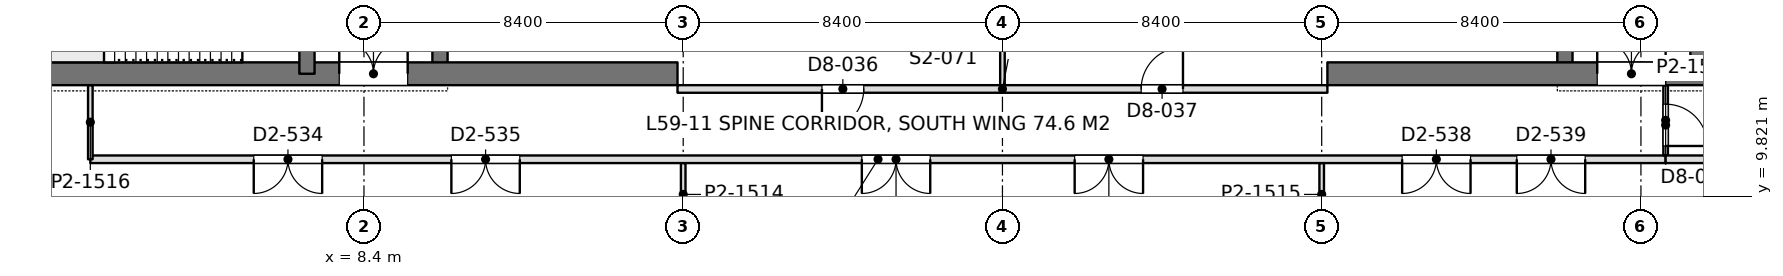
"""IFC4 building model, lengths in metres.
Left out: names, types, materials, properties, quantities, classifications, styles, units other than length and angle.
Written with IfcOpenShell. Run it as: python <this file> out.ifc"""

import sys

from ifc_helpers import new_model, si_unit, direction, frame, frame_2d, origin, place, context, subcontext, project, spatial, rectangle, extrude, element, fill, save


model = new_model("IFC4")
c1 = context("Model", 3, precision=1e-05, world=origin(), true_north=direction((0.0, 1.0)))
c2 = subcontext(c1, "Body", "Model", "MODEL_VIEW")
j1 = project(units=[si_unit("LENGTHUNIT", "METRE"), si_unit("PLANEANGLEUNIT", "RADIAN")], contexts=[c1])
p1 = place(None, origin())
s1 = spatial("IfcSite", under=j1, at=p1, CompositionType="ELEMENT")
p2 = place(p1, origin())
s2 = spatial("IfcBuilding", under=s1, at=p2, CompositionType="ELEMENT")
p3 = place(p2, frame((0.0, 0.0, 259.2)))
s3 = spatial("IfcBuildingStorey", under=s2, at=p3, CompositionType="ELEMENT", Elevation=259.2)
p4 = place(p3, frame((-1.05, 13.05, 0.0), z_axis=(0.0, 0.0, 1.0), x_axis=(1.0, 0.0, 0.0)))
e1 = element("IfcWall", 1, at=p4, inside=s3, PredefinedType="SHEAR", context=c2, shape_type="SweptSolid", body=[
    extrude(rectangle(XDim=17.7, YDim=0.6, at=frame_2d((8.85, 0.0))), origin(), (0.0, 0.0, 1.0), 4.5),
])
p5 = place(p4, frame((8.8, 0.0, 0.0)))
e2 = element("IfcOpeningElement", 2, at=p5, cuts=e1, PredefinedType="OPENING", context=c2, shape_type="SweptSolid", body=[
    extrude(rectangle(XDim=1.8, YDim=2.4, at=frame_2d((0.9, 1.2))), frame((0.0, 0.31, 0.0), z_axis=(0.0, -1.0, 0.0), x_axis=(1.0, 0.0, 0.0)), (0.0, 0.0, 1.0), 0.62),
])
p6 = place(p3, frame((6.9, 13.05, 0.0), z_axis=(0.0, 0.0, 1.0), x_axis=(0.0, 1.0, 0.0)))
e3 = element("IfcWall", 3, at=p6, inside=s3, PredefinedType="SHEAR", context=c2, shape_type="SweptSolid", body=[
    extrude(rectangle(XDim=24.3, YDim=0.4, at=frame_2d((12.15, 0.0))), origin(), (0.0, 0.0, 1.0), 4.5),
])
p7 = place(p6, frame((1.3, 0.0, 0.0)))
e4 = element("IfcOpeningElement", 4, at=p7, cuts=e3, PredefinedType="OPENING", context=c2, shape_type="SweptSolid", body=[
    extrude(rectangle(XDim=1.0, YDim=2.2, at=frame_2d((0.5, 1.1))), frame((0.0, 0.21, 0.0), z_axis=(0.0, -1.0, 0.0), x_axis=(1.0, 0.0, 0.0)), (0.0, 0.0, 1.0), 0.42),
])
p8 = place(p6, frame((22.0, 0.0, 0.0)))
e5 = element("IfcOpeningElement", 5, at=p8, cuts=e3, PredefinedType="OPENING", context=c2, shape_type="SweptSolid", body=[
    extrude(rectangle(XDim=1.0, YDim=2.2, at=frame_2d((0.5, 1.1))), frame((0.0, 0.21, 0.0), z_axis=(0.0, -1.0, 0.0), x_axis=(1.0, 0.0, 0.0)), (0.0, 0.0, 1.0), 0.42),
])
p9 = place(p6, frame((5.55, 0.0, 0.0)))
e6 = element("IfcOpeningElement", 6, at=p9, cuts=e3, PredefinedType="OPENING", context=c2, shape_type="SweptSolid", body=[
    extrude(rectangle(XDim=1.0, YDim=2.2, at=frame_2d((0.5, 1.1))), frame((0.0, 0.21, 0.0), z_axis=(0.0, -1.0, 0.0), x_axis=(1.0, 0.0, 0.0)), (0.0, 0.0, 1.0), 0.42),
])
p10 = place(p6, frame((9.55, 0.0, 0.0)))
e7 = element("IfcOpeningElement", 7, at=p10, cuts=e3, PredefinedType="OPENING", context=c2, shape_type="SweptSolid", body=[
    extrude(rectangle(XDim=1.0, YDim=2.2, at=frame_2d((0.5, 1.1))), frame((0.0, 0.21, 0.0), z_axis=(0.0, -1.0, 0.0), x_axis=(1.0, 0.0, 0.0)), (0.0, 0.0, 1.0), 0.42),
])
p11 = place(p6, frame((12.8, 0.0, 0.0)))
e8 = element("IfcOpeningElement", 8, at=p11, cuts=e3, PredefinedType="OPENING", context=c2, shape_type="SweptSolid", body=[
    extrude(rectangle(XDim=1.1, YDim=2.2, at=frame_2d((0.55, 1.1))), frame((0.0, 0.21, 0.0), z_axis=(0.0, -1.0, 0.0), x_axis=(1.0, 0.0, 0.0)), (0.0, 0.0, 1.0), 0.42),
])
p12 = place(p6, frame((15.538, 0.0, 0.0)))
e9 = element("IfcOpeningElement", 9, at=p12, cuts=e3, PredefinedType="OPENING", context=c2, shape_type="SweptSolid", body=[
    extrude(rectangle(XDim=1.1, YDim=2.2, at=frame_2d((0.55, 1.1))), frame((0.0, 0.21, 0.0), z_axis=(0.0, -1.0, 0.0), x_axis=(1.0, 0.0, 0.0)), (0.0, 0.0, 1.0), 0.42),
])
p13 = place(p6, frame((18.262, 0.0, 0.0)))
e10 = element("IfcOpeningElement", 10, at=p13, cuts=e3, PredefinedType="OPENING", context=c2, shape_type="SweptSolid", body=[
    extrude(rectangle(XDim=1.1, YDim=2.2, at=frame_2d((0.55, 1.1))), frame((0.0, 0.21, 0.0), z_axis=(0.0, -1.0, 0.0), x_axis=(1.0, 0.0, 0.0)), (0.0, 0.0, 1.0), 0.42),
])
p14 = place(p3, frame((10.4, 13.05, 0.0), z_axis=(0.0, 0.0, 1.0), x_axis=(0.0, 1.0, 0.0)))
e11 = element("IfcWall", 11, at=p14, inside=s3, PredefinedType="SHEAR", context=c2, shape_type="SweptSolid", body=[
    extrude(rectangle(XDim=24.3, YDim=0.4, at=frame_2d((12.15, 0.0))), origin(), (0.0, 0.0, 1.0), 4.5),
])
p15 = place(p14, frame((15.75, 0.0, 0.0)))
e12 = element("IfcOpeningElement", 12, at=p15, cuts=e11, PredefinedType="OPENING", context=c2, shape_type="SweptSolid", body=[
    extrude(rectangle(XDim=1.1, YDim=2.2, at=frame_2d((0.55, 1.1))), frame((0.0, 0.21, 0.0), z_axis=(0.0, -1.0, 0.0), x_axis=(1.0, 0.0, 0.0)), (0.0, 0.0, 1.0), 0.42),
])
p16 = place(p14, frame((18.6, 0.0, 0.0)))
e13 = element("IfcOpeningElement", 13, at=p16, cuts=e11, PredefinedType="OPENING", context=c2, shape_type="SweptSolid", body=[
    extrude(rectangle(XDim=1.1, YDim=2.2, at=frame_2d((0.55, 1.1))), frame((0.0, 0.21, 0.0), z_axis=(0.0, -1.0, 0.0), x_axis=(1.0, 0.0, 0.0)), (0.0, 0.0, 1.0), 0.42),
])
p17 = place(p14, frame((21.45, 0.0, 0.0)))
e14 = element("IfcOpeningElement", 14, at=p17, cuts=e11, PredefinedType="OPENING", context=c2, shape_type="SweptSolid", body=[
    extrude(rectangle(XDim=1.1, YDim=2.2, at=frame_2d((0.55, 1.1))), frame((0.0, 0.21, 0.0), z_axis=(0.0, -1.0, 0.0), x_axis=(1.0, 0.0, 0.0)), (0.0, 0.0, 1.0), 0.42),
])
p18 = place(p14, frame((8.65, 0.0, 0.0)))
e15 = element("IfcOpeningElement", 15, at=p18, cuts=e11, PredefinedType="OPENING", context=c2, shape_type="SweptSolid", body=[
    extrude(rectangle(XDim=1.8, YDim=2.4, at=frame_2d((0.9, 1.2))), frame((0.0, 0.21, 0.0), z_axis=(0.0, -1.0, 0.0), x_axis=(1.0, 0.0, 0.0)), (0.0, 0.0, 1.0), 0.42),
])
p19 = place(p3, frame((33.75, 13.05, 0.0), z_axis=(0.0, 0.0, 1.0), x_axis=(1.0, 0.0, 0.0)))
e16 = element("IfcWall", 16, at=p19, inside=s3, PredefinedType="SHEAR", context=c2, shape_type="SweptSolid", body=[
    extrude(rectangle(XDim=17.7, YDim=0.6, at=frame_2d((8.85, 0.0))), origin(), (0.0, 0.0, 1.0), 4.5),
])
p20 = place(p19, frame((7.1, 0.0, 0.0)))
e17 = element("IfcOpeningElement", 17, at=p20, cuts=e16, PredefinedType="OPENING", context=c2, shape_type="SweptSolid", body=[
    extrude(rectangle(XDim=1.8, YDim=2.4, at=frame_2d((0.9, 1.2))), frame((0.0, 0.31, 0.0), z_axis=(0.0, -1.0, 0.0), x_axis=(1.0, 0.0, 0.0)), (0.0, 0.0, 1.0), 0.62),
])
p21 = place(p3, frame((43.5, 13.05, 0.0), z_axis=(0.0, 0.0, 1.0), x_axis=(0.0, 1.0, 0.0)))
e18 = element("IfcWall", 18, at=p21, inside=s3, PredefinedType="SHEAR", context=c2, shape_type="SweptSolid", body=[
    extrude(rectangle(XDim=24.3, YDim=0.4, at=frame_2d((12.15, 0.0))), origin(), (0.0, 0.0, 1.0), 4.5),
])
p22 = place(p21, frame((1.3, 0.0, 0.0)))
e19 = element("IfcOpeningElement", 19, at=p22, cuts=e18, PredefinedType="OPENING", context=c2, shape_type="SweptSolid", body=[
    extrude(rectangle(XDim=1.0, YDim=2.2, at=frame_2d((0.5, 1.1))), frame((0.0, 0.21, 0.0), z_axis=(0.0, -1.0, 0.0), x_axis=(1.0, 0.0, 0.0)), (0.0, 0.0, 1.0), 0.42),
])
p23 = place(p21, frame((22.0, 0.0, 0.0)))
e20 = element("IfcOpeningElement", 20, at=p23, cuts=e18, PredefinedType="OPENING", context=c2, shape_type="SweptSolid", body=[
    extrude(rectangle(XDim=1.0, YDim=2.2, at=frame_2d((0.5, 1.1))), frame((0.0, 0.21, 0.0), z_axis=(0.0, -1.0, 0.0), x_axis=(1.0, 0.0, 0.0)), (0.0, 0.0, 1.0), 0.42),
])
p24 = place(p21, frame((5.55, 0.0, 0.0)))
e21 = element("IfcOpeningElement", 21, at=p24, cuts=e18, PredefinedType="OPENING", context=c2, shape_type="SweptSolid", body=[
    extrude(rectangle(XDim=1.0, YDim=2.2, at=frame_2d((0.5, 1.1))), frame((0.0, 0.21, 0.0), z_axis=(0.0, -1.0, 0.0), x_axis=(1.0, 0.0, 0.0)), (0.0, 0.0, 1.0), 0.42),
])
p25 = place(p21, frame((9.55, 0.0, 0.0)))
e22 = element("IfcOpeningElement", 22, at=p25, cuts=e18, PredefinedType="OPENING", context=c2, shape_type="SweptSolid", body=[
    extrude(rectangle(XDim=1.0, YDim=2.2, at=frame_2d((0.5, 1.1))), frame((0.0, 0.21, 0.0), z_axis=(0.0, -1.0, 0.0), x_axis=(1.0, 0.0, 0.0)), (0.0, 0.0, 1.0), 0.42),
])
p26 = place(p21, frame((12.8, 0.0, 0.0)))
e23 = element("IfcOpeningElement", 23, at=p26, cuts=e18, PredefinedType="OPENING", context=c2, shape_type="SweptSolid", body=[
    extrude(rectangle(XDim=1.1, YDim=2.2, at=frame_2d((0.55, 1.1))), frame((0.0, 0.21, 0.0), z_axis=(0.0, -1.0, 0.0), x_axis=(1.0, 0.0, 0.0)), (0.0, 0.0, 1.0), 0.42),
])
p27 = place(p21, frame((15.538, 0.0, 0.0)))
e24 = element("IfcOpeningElement", 24, at=p27, cuts=e18, PredefinedType="OPENING", context=c2, shape_type="SweptSolid", body=[
    extrude(rectangle(XDim=1.1, YDim=2.2, at=frame_2d((0.55, 1.1))), frame((0.0, 0.21, 0.0), z_axis=(0.0, -1.0, 0.0), x_axis=(1.0, 0.0, 0.0)), (0.0, 0.0, 1.0), 0.42),
])
p28 = place(p21, frame((18.262, 0.0, 0.0)))
e25 = element("IfcOpeningElement", 25, at=p28, cuts=e18, PredefinedType="OPENING", context=c2, shape_type="SweptSolid", body=[
    extrude(rectangle(XDim=1.1, YDim=2.2, at=frame_2d((0.55, 1.1))), frame((0.0, 0.21, 0.0), z_axis=(0.0, -1.0, 0.0), x_axis=(1.0, 0.0, 0.0)), (0.0, 0.0, 1.0), 0.42),
])
p29 = place(p3, frame((40.0, 13.05, 0.0), z_axis=(0.0, 0.0, 1.0), x_axis=(0.0, 1.0, 0.0)))
e26 = element("IfcWall", 26, at=p29, inside=s3, PredefinedType="SHEAR", context=c2, shape_type="SweptSolid", body=[
    extrude(rectangle(XDim=24.3, YDim=0.4, at=frame_2d((12.15, 0.0))), origin(), (0.0, 0.0, 1.0), 4.5),
])
p30 = place(p29, frame((15.75, 0.0, 0.0)))
e27 = element("IfcOpeningElement", 27, at=p30, cuts=e26, PredefinedType="OPENING", context=c2, shape_type="SweptSolid", body=[
    extrude(rectangle(XDim=1.1, YDim=2.2, at=frame_2d((0.55, 1.1))), frame((0.0, 0.21, 0.0), z_axis=(0.0, -1.0, 0.0), x_axis=(1.0, 0.0, 0.0)), (0.0, 0.0, 1.0), 0.42),
])
p31 = place(p29, frame((18.6, 0.0, 0.0)))
e28 = element("IfcOpeningElement", 28, at=p31, cuts=e26, PredefinedType="OPENING", context=c2, shape_type="SweptSolid", body=[
    extrude(rectangle(XDim=1.1, YDim=2.2, at=frame_2d((0.55, 1.1))), frame((0.0, 0.21, 0.0), z_axis=(0.0, -1.0, 0.0), x_axis=(1.0, 0.0, 0.0)), (0.0, 0.0, 1.0), 0.42),
])
p32 = place(p29, frame((21.45, 0.0, 0.0)))
e29 = element("IfcOpeningElement", 29, at=p32, cuts=e26, PredefinedType="OPENING", context=c2, shape_type="SweptSolid", body=[
    extrude(rectangle(XDim=1.1, YDim=2.2, at=frame_2d((0.55, 1.1))), frame((0.0, 0.21, 0.0), z_axis=(0.0, -1.0, 0.0), x_axis=(1.0, 0.0, 0.0)), (0.0, 0.0, 1.0), 0.42),
])
p33 = place(p29, frame((8.65, 0.0, 0.0)))
e30 = element("IfcOpeningElement", 30, at=p33, cuts=e26, PredefinedType="OPENING", context=c2, shape_type="SweptSolid", body=[
    extrude(rectangle(XDim=1.8, YDim=2.4, at=frame_2d((0.9, 1.2))), frame((0.0, 0.21, 0.0), z_axis=(0.0, -1.0, 0.0), x_axis=(1.0, 0.0, 0.0)), (0.0, 0.0, 1.0), 0.42),
])
for number, where, z_axis, x_axis in (
    (31, (16.8, 9.049, 0.0), (0.0, 0.0, 1.0), (0.0, 1.0, 0.0)),
    (32, (33.6, 9.049, 0.0), (0.0, 0.0, 1.0), (0.0, 1.0, 0.0)),
):
    element("IfcWall", number, at=place(p3, frame(where, z_axis=z_axis, x_axis=x_axis)), inside=s3, PredefinedType="PARTITIONING", context=c2, shape_type="SweptSolid", body=[
        extrude(rectangle(XDim=1.653, YDim=0.12, at=frame_2d((0.826, 0.0))), origin(), (0.0, 0.0, 1.0), 3.99),
    ])
p34 = place(p3, frame((1.2, 10.8, 0.0), z_axis=(0.0, 0.0, 1.0), x_axis=(1.0, 0.0, 0.0)))
e33 = element("IfcWall", 33, at=p34, inside=s3, PredefinedType="PARTITIONING", context=c2, shape_type="SweptSolid", body=[
    extrude(rectangle(XDim=41.452, YDim=0.2, at=frame_2d((20.726, 0.0))), origin(), (0.0, 0.0, 1.0), 3.8),
])
p35 = place(p34, frame((4.3, 0.0, 0.0)))
e34 = element("IfcOpeningElement", 34, at=p35, cuts=e33, PredefinedType="OPENING", context=c2, shape_type="SweptSolid", body=[
    extrude(rectangle(XDim=1.8, YDim=2.2, at=frame_2d((0.9, 1.1))), frame((0.0, 0.11, 0.0), z_axis=(0.0, -1.0, 0.0), x_axis=(1.0, 0.0, 0.0)), (0.0, 0.0, 1.0), 0.22),
])
p36 = place(p34, frame((9.5, 0.0, 0.0)))
e35 = element("IfcOpeningElement", 35, at=p36, cuts=e33, PredefinedType="OPENING", context=c2, shape_type="SweptSolid", body=[
    extrude(rectangle(XDim=1.8, YDim=2.2, at=frame_2d((0.9, 1.1))), frame((0.0, 0.11, 0.0), z_axis=(0.0, -1.0, 0.0), x_axis=(1.0, 0.0, 0.0)), (0.0, 0.0, 1.0), 0.22),
])
p37 = place(p34, frame((20.3, 0.0, 0.0)))
e36 = element("IfcOpeningElement", 36, at=p37, cuts=e33, PredefinedType="OPENING", context=c2, shape_type="SweptSolid", body=[
    extrude(rectangle(XDim=1.8, YDim=2.2, at=frame_2d((0.9, 1.1))), frame((0.0, 0.11, 0.0), z_axis=(0.0, -1.0, 0.0), x_axis=(1.0, 0.0, 0.0)), (0.0, 0.0, 1.0), 0.22),
])
p38 = place(p34, frame((25.9, 0.0, 0.0)))
e37 = element("IfcOpeningElement", 37, at=p38, cuts=e33, PredefinedType="OPENING", context=c2, shape_type="SweptSolid", body=[
    extrude(rectangle(XDim=1.8, YDim=2.2, at=frame_2d((0.9, 1.1))), frame((0.0, 0.11, 0.0), z_axis=(0.0, -1.0, 0.0), x_axis=(1.0, 0.0, 0.0)), (0.0, 0.0, 1.0), 0.22),
])
p39 = place(p34, frame((34.517, 0.0, 0.0)))
e38 = element("IfcOpeningElement", 38, at=p39, cuts=e33, PredefinedType="OPENING", context=c2, shape_type="SweptSolid", body=[
    extrude(rectangle(XDim=1.8, YDim=2.2, at=frame_2d((0.9, 1.1))), frame((0.0, 0.11, 0.0), z_axis=(0.0, -1.0, 0.0), x_axis=(1.0, 0.0, 0.0)), (0.0, 0.0, 1.0), 0.22),
])
p40 = place(p34, frame((37.533, 0.0, 0.0)))
e39 = element("IfcOpeningElement", 39, at=p40, cuts=e33, PredefinedType="OPENING", context=c2, shape_type="SweptSolid", body=[
    extrude(rectangle(XDim=1.8, YDim=2.2, at=frame_2d((0.9, 1.1))), frame((0.0, 0.11, 0.0), z_axis=(0.0, -1.0, 0.0), x_axis=(1.0, 0.0, 0.0)), (0.0, 0.0, 1.0), 0.22),
])
p41 = place(p3, frame((1.2, 10.8, 0.0), z_axis=(0.0, 0.0, 1.0), x_axis=(0.0, 1.0, 0.0)))
e40 = element("IfcWall", 40, at=p41, inside=s3, PredefinedType="PARTITIONING", context=c2, shape_type="SweptSolid", body=[
    extrude(rectangle(XDim=1.952, YDim=0.12, at=frame_2d((0.976, 0.0))), origin(), (0.0, 0.0, 1.0), 4.35),
])
p42 = place(p3, frame((42.65, 10.898, 0.0), z_axis=(0.0, 0.0, 1.0), x_axis=(0.0, 1.0, 0.0)))
e41 = element("IfcWall", 41, at=p42, inside=s3, PredefinedType="PARTITIONING", context=c2, shape_type="SweptSolid", body=[
    extrude(rectangle(XDim=1.854, YDim=0.12, at=frame_2d((0.927, 0.0))), origin(), (0.0, 0.0, 1.0), 4.35),
])
p43 = place(p42, frame((0.252, 0.0, 0.0)))
e42 = element("IfcOpeningElement", 42, at=p43, cuts=e41, PredefinedType="OPENING", context=c2, shape_type="SweptSolid", body=[
    extrude(rectangle(XDim=1.1, YDim=2.4, at=frame_2d((0.55, 1.2))), frame((0.0, 0.07, 0.0), z_axis=(0.0, -1.0, 0.0), x_axis=(1.0, 0.0, 0.0)), (0.0, 0.0, 1.0), 0.14),
])
p44 = place(p3, frame((42.648, 10.8, 0.0), z_axis=(0.0, 0.0, 1.0), x_axis=(1.0, 0.0, 0.0)))
e43 = element("IfcWall", 43, at=p44, inside=s3, PredefinedType="PARTITIONING", context=c2, shape_type="SweptSolid", body=[
    extrude(rectangle(XDim=6.552, YDim=0.2, at=frame_2d((3.276, 0.0))), origin(), (0.0, 0.0, 1.0), 4.35),
])
p45 = place(p3, frame((25.2, 12.698, 0.0), z_axis=(0.0, 0.0, 1.0), x_axis=(0.0, 1.0, 0.0)))
e44 = element("IfcWall", 44, at=p45, inside=s3, PredefinedType="PARTITIONING", context=c2, shape_type="SweptSolid", body=[
    extrude(rectangle(XDim=3.603, YDim=0.12, at=frame_2d((1.802, 0.0))), origin(), (0.0, 0.0, 1.0), 3.8),
])
p46 = place(p3, frame((16.65, 12.65, 0.0), z_axis=(0.0, 0.0, 1.0), x_axis=(1.0, 0.0, 0.0)))
e45 = element("IfcWall", 45, at=p46, inside=s3, PredefinedType="PARTITIONING", context=c2, shape_type="SweptSolid", body=[
    extrude(rectangle(XDim=17.1, YDim=0.2, at=frame_2d((8.55, 0.0))), origin(), (0.0, 0.0, 1.0), 3.8),
])
p47 = place(p46, frame((3.8, 0.0, 0.0)))
e46 = element("IfcOpeningElement", 46, at=p47, cuts=e45, PredefinedType="OPENING", context=c2, shape_type="SweptSolid", body=[
    extrude(rectangle(XDim=1.1, YDim=2.4, at=frame_2d((0.55, 1.2))), frame((0.0, 0.11, 0.0), z_axis=(0.0, -1.0, 0.0), x_axis=(1.0, 0.0, 0.0)), (0.0, 0.0, 1.0), 0.22),
])
p48 = place(p46, frame((12.2, 0.0, 0.0)))
e47 = element("IfcOpeningElement", 47, at=p48, cuts=e45, PredefinedType="OPENING", context=c2, shape_type="SweptSolid", body=[
    extrude(rectangle(XDim=1.1, YDim=2.4, at=frame_2d((0.55, 1.2))), frame((0.0, 0.11, 0.0), z_axis=(0.0, -1.0, 0.0), x_axis=(1.0, 0.0, 0.0)), (0.0, 0.0, 1.0), 0.22),
])
p49 = place(p5, origin())
e48 = element("IfcDoor", 48, at=p49, inside=s3, OperationType="DOUBLE_DOOR_SINGLE_SWING", PredefinedType="DOOR", context=c2, shape_type="SweptSolid", body=[
    extrude(rectangle(XDim=1.8, YDim=2.4, at=frame_2d((0.9, 1.2))), frame((0.0, 0.025, 0.0), z_axis=(0.0, -1.0, 0.0), x_axis=(1.0, 0.0, 0.0)), (0.0, 0.0, 1.0), 0.05),
])
fill(e2, e48)
p50 = place(p20, origin())
e49 = element("IfcDoor", 49, at=p50, inside=s3, OperationType="DOUBLE_DOOR_SINGLE_SWING", PredefinedType="DOOR", context=c2, shape_type="SweptSolid", body=[
    extrude(rectangle(XDim=1.8, YDim=2.4, at=frame_2d((0.9, 1.2))), frame((0.0, 0.025, 0.0), z_axis=(0.0, -1.0, 0.0), x_axis=(1.0, 0.0, 0.0)), (0.0, 0.0, 1.0), 0.05),
])
fill(e17, e49)
p51 = place(p35, frame((1.8, 0.0, 0.0), z_axis=(0.0, 0.0, 1.0), x_axis=(-1.0, 0.0, 0.0)))
e50 = element("IfcDoor", 50, at=p51, inside=s3, OperationType="DOUBLE_DOOR_SINGLE_SWING", PredefinedType="DOOR", context=c2, shape_type="SweptSolid", body=[
    extrude(rectangle(XDim=1.8, YDim=2.2, at=frame_2d((0.9, 1.1))), frame((0.0, 0.025, 0.0), z_axis=(0.0, -1.0, 0.0), x_axis=(1.0, 0.0, 0.0)), (0.0, 0.0, 1.0), 0.05),
])
fill(e34, e50)
p52 = place(p36, frame((1.8, 0.0, 0.0), z_axis=(0.0, 0.0, 1.0), x_axis=(-1.0, 0.0, 0.0)))
e51 = element("IfcDoor", 51, at=p52, inside=s3, OperationType="DOUBLE_DOOR_SINGLE_SWING", PredefinedType="DOOR", context=c2, shape_type="SweptSolid", body=[
    extrude(rectangle(XDim=1.8, YDim=2.2, at=frame_2d((0.9, 1.1))), frame((0.0, 0.025, 0.0), z_axis=(0.0, -1.0, 0.0), x_axis=(1.0, 0.0, 0.0)), (0.0, 0.0, 1.0), 0.05),
])
fill(e35, e51)
p53 = place(p37, frame((1.8, 0.0, 0.0), z_axis=(0.0, 0.0, 1.0), x_axis=(-1.0, 0.0, 0.0)))
e52 = element("IfcDoor", 52, at=p53, inside=s3, OperationType="DOUBLE_DOOR_SINGLE_SWING", PredefinedType="DOOR", context=c2, shape_type="SweptSolid", body=[
    extrude(rectangle(XDim=1.8, YDim=2.2, at=frame_2d((0.9, 1.1))), frame((0.0, 0.025, 0.0), z_axis=(0.0, -1.0, 0.0), x_axis=(1.0, 0.0, 0.0)), (0.0, 0.0, 1.0), 0.05),
])
fill(e36, e52)
p54 = place(p38, frame((1.8, 0.0, 0.0), z_axis=(0.0, 0.0, 1.0), x_axis=(-1.0, 0.0, 0.0)))
e53 = element("IfcDoor", 53, at=p54, inside=s3, OperationType="DOUBLE_DOOR_SINGLE_SWING", PredefinedType="DOOR", context=c2, shape_type="SweptSolid", body=[
    extrude(rectangle(XDim=1.8, YDim=2.2, at=frame_2d((0.9, 1.1))), frame((0.0, 0.025, 0.0), z_axis=(0.0, -1.0, 0.0), x_axis=(1.0, 0.0, 0.0)), (0.0, 0.0, 1.0), 0.05),
])
fill(e37, e53)
p55 = place(p39, frame((1.8, 0.0, 0.0), z_axis=(0.0, 0.0, 1.0), x_axis=(-1.0, 0.0, 0.0)))
e54 = element("IfcDoor", 54, at=p55, inside=s3, OperationType="DOUBLE_DOOR_SINGLE_SWING", PredefinedType="DOOR", context=c2, shape_type="SweptSolid", body=[
    extrude(rectangle(XDim=1.8, YDim=2.2, at=frame_2d((0.9, 1.1))), frame((0.0, 0.025, 0.0), z_axis=(0.0, -1.0, 0.0), x_axis=(1.0, 0.0, 0.0)), (0.0, 0.0, 1.0), 0.05),
])
fill(e38, e54)
p56 = place(p40, frame((1.8, 0.0, 0.0), z_axis=(0.0, 0.0, 1.0), x_axis=(-1.0, 0.0, 0.0)))
e55 = element("IfcDoor", 55, at=p56, inside=s3, OperationType="DOUBLE_DOOR_SINGLE_SWING", PredefinedType="DOOR", context=c2, shape_type="SweptSolid", body=[
    extrude(rectangle(XDim=1.8, YDim=2.2, at=frame_2d((0.9, 1.1))), frame((0.0, 0.025, 0.0), z_axis=(0.0, -1.0, 0.0), x_axis=(1.0, 0.0, 0.0)), (0.0, 0.0, 1.0), 0.05),
])
fill(e39, e55)
p57 = place(p43, frame((1.1, 0.0, 0.0), z_axis=(0.0, 0.0, 1.0), x_axis=(-1.0, 0.0, 0.0)))
e56 = element("IfcDoor", 56, at=p57, inside=s3, OperationType="SINGLE_SWING_RIGHT", PredefinedType="DOOR", context=c2, shape_type="SweptSolid", body=[
    extrude(rectangle(XDim=1.1, YDim=2.4, at=frame_2d((0.55, 1.2))), frame((0.0, 0.025, 0.0), z_axis=(0.0, -1.0, 0.0), x_axis=(1.0, 0.0, 0.0)), (0.0, 0.0, 1.0), 0.05),
])
fill(e42, e56)
p58 = place(p47, frame((1.1, 0.0, 0.0), z_axis=(0.0, 0.0, 1.0), x_axis=(-1.0, 0.0, 0.0)))
e57 = element("IfcDoor", 57, at=p58, inside=s3, OperationType="SINGLE_SWING_RIGHT", PredefinedType="DOOR", context=c2, shape_type="SweptSolid", body=[
    extrude(rectangle(XDim=1.1, YDim=2.4, at=frame_2d((0.55, 1.2))), frame((0.0, 0.025, 0.0), z_axis=(0.0, -1.0, 0.0), x_axis=(1.0, 0.0, 0.0)), (0.0, 0.0, 1.0), 0.05),
])
fill(e46, e57)
p59 = place(p48, origin())
e58 = element("IfcDoor", 58, at=p59, inside=s3, OperationType="SINGLE_SWING_RIGHT", PredefinedType="DOOR", context=c2, shape_type="SweptSolid", body=[
    extrude(rectangle(XDim=1.1, YDim=2.4, at=frame_2d((0.55, 1.2))), frame((0.0, 0.025, 0.0), z_axis=(0.0, -1.0, 0.0), x_axis=(1.0, 0.0, 0.0)), (0.0, 0.0, 1.0), 0.05),
])
fill(e47, e58)
save(model, sys.argv[1])
